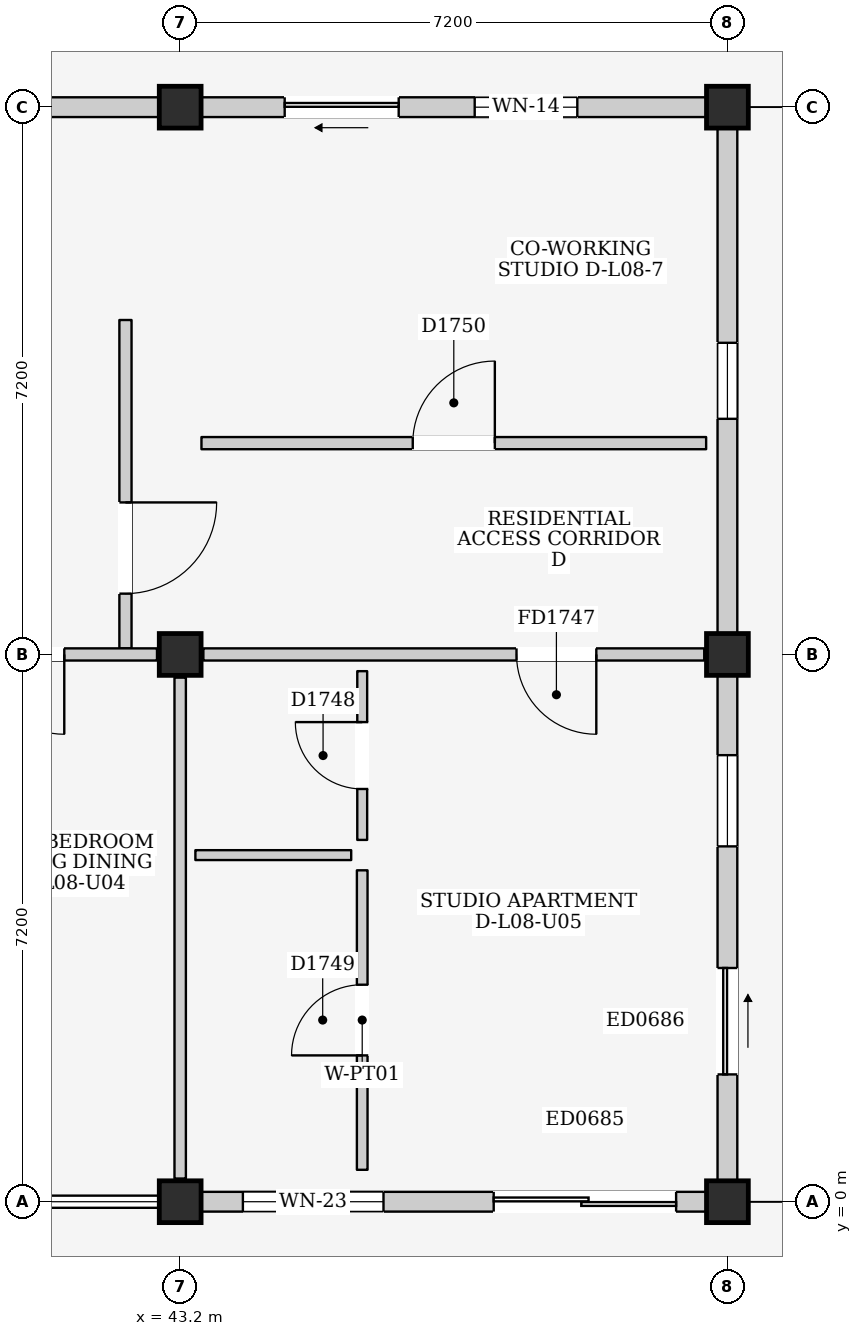
"""IFC4 building model, lengths in metres.
Left out: names, types, materials, properties, quantities, classifications, styles, units other than length and angle.
Written with IfcOpenShell. Run it as: python <this file> out.ifc"""

import sys

from ifc_helpers import new_model, si_unit, direction, frame, frame_2d, origin, origin_2d, place, context, subcontext, project, spatial, rectangle, extrude, element, fill, save


model = new_model("IFC4")
c1 = context("Model", 3, precision=1e-05, world=origin(), true_north=direction((0.0, 1.0)))
c2 = subcontext(c1, "Body", "Model", "MODEL_VIEW")
j1 = project(units=[si_unit("LENGTHUNIT", "METRE"), si_unit("PLANEANGLEUNIT", "RADIAN")], contexts=[c1])
p1 = place(None, origin())
s1 = spatial("IfcSite", under=j1, at=p1, CompositionType="ELEMENT")
p2 = place(p1, origin())
s2 = spatial("IfcBuilding", under=s1, at=p2, CompositionType="ELEMENT")
p3 = place(p2, frame((0.0, 0.0, 28.3)))
s3 = spatial("IfcBuildingStorey", under=s2, at=p3, CompositionType="ELEMENT", Elevation=28.3)
for number, where, z_axis, x_axis in (
    (1, (43.2, 0.0, 0.0), (0.0, 0.0, 1.0), (1.0, 0.0, 0.0)),
    (2, (43.2, 7.2, 0.0), (0.0, 0.0, 1.0), (1.0, 0.0, 0.0)),
    (3, (43.2, 14.4, 0.0), (0.0, 0.0, 1.0), (1.0, 0.0, 0.0)),
    (4, (50.4, 0.0, 0.0), (0.0, 0.0, 1.0), (1.0, 0.0, 0.0)),
    (5, (50.4, 7.2, 0.0), (0.0, 0.0, 1.0), (1.0, 0.0, 0.0)),
    (6, (50.4, 14.4, 0.0), (0.0, 0.0, 1.0), (1.0, 0.0, 0.0)),
):
    element("IfcColumn", number, at=place(p3, frame(where, z_axis=z_axis, x_axis=x_axis)), inside=s3, PredefinedType="COLUMN", context=c2, shape_type="SweptSolid", body=[
        extrude(rectangle(XDim=0.55, YDim=0.55, at=origin_2d()), origin(), (0.0, 0.0, 1.0), 3.2),
    ])
p4 = place(p3, frame((36.275, 14.4, 0.0), z_axis=(0.0, 0.0, 1.0), x_axis=(1.0, 0.0, 0.0)))
e7 = element("IfcWall", 7, at=p4, inside=s3, PredefinedType="ELEMENTEDWALL", context=c2, shape_type="SweptSolid", body=[
    extrude(rectangle(XDim=6.65, YDim=0.26, at=frame_2d((3.325, 0.0))), origin(), (0.0, 0.0, 1.0), 2.345),
])
p5 = place(p4, frame((2.825, 0.0, 1.2)))
e8 = element("IfcOpeningElement", 8, at=p5, cuts=e7, PredefinedType="OPENING", context=c2, shape_type="SweptSolid", body=[
    extrude(rectangle(XDim=1.0, YDim=0.9, at=frame_2d((0.5, 0.45))), frame((0.0, 0.145, 0.0), z_axis=(0.0, -1.0, 0.0), x_axis=(1.0, 0.0, 0.0)), (0.0, 0.0, 1.0), 0.29),
])
p6 = place(p3, frame((43.475, 0.0, 0.0), z_axis=(0.0, 0.0, 1.0), x_axis=(1.0, 0.0, 0.0)))
e9 = element("IfcWall", 9, at=p6, inside=s3, PredefinedType="ELEMENTEDWALL", context=c2, shape_type="SweptSolid", body=[
    extrude(rectangle(XDim=6.65, YDim=0.26, at=frame_2d((3.325, 0.0))), origin(), (0.0, 0.0, 1.0), 2.495),
])
p7 = place(p6, frame((3.85, 0.0, 0.0)))
e10 = element("IfcOpeningElement", 10, at=p7, cuts=e9, PredefinedType="OPENING", context=c2, shape_type="SweptSolid", body=[
    extrude(rectangle(XDim=2.4, YDim=2.12, at=frame_2d((1.2, 1.06))), frame((0.0, 0.145, 0.0), z_axis=(0.0, -1.0, 0.0), x_axis=(1.0, 0.0, 0.0)), (0.0, 0.0, 1.0), 0.29),
])
p8 = place(p6, frame((0.55, 0.0, 0.9)))
e11 = element("IfcOpeningElement", 11, at=p8, cuts=e9, PredefinedType="OPENING", context=c2, shape_type="SweptSolid", body=[
    extrude(rectangle(XDim=1.85, YDim=1.4, at=frame_2d((0.925, 0.7))), frame((0.0, 0.145, 0.0), z_axis=(0.0, -1.0, 0.0), x_axis=(1.0, 0.0, 0.0)), (0.0, 0.0, 1.0), 0.29),
])
p9 = place(p3, frame((50.4, 0.275, 0.0), z_axis=(0.0, 0.0, 1.0), x_axis=(0.0, 1.0, 0.0)))
e12 = element("IfcWall", 12, at=p9, inside=s3, PredefinedType="ELEMENTEDWALL", context=c2, shape_type="SweptSolid", body=[
    extrude(rectangle(XDim=6.65, YDim=0.26, at=frame_2d((3.325, 0.0))), origin(), (0.0, 0.0, 1.0), 2.445),
])
p10 = place(p9, frame((1.4, 0.0, 0.0)))
e13 = element("IfcOpeningElement", 13, at=p10, cuts=e12, PredefinedType="OPENING", context=c2, shape_type="SweptSolid", body=[
    extrude(rectangle(XDim=1.4, YDim=2.1, at=frame_2d((0.7, 1.05))), frame((0.0, 0.145, 0.0), z_axis=(0.0, -1.0, 0.0), x_axis=(1.0, 0.0, 0.0)), (0.0, 0.0, 1.0), 0.29),
])
p11 = place(p9, frame((4.4, 0.0, 0.95)))
e14 = element("IfcOpeningElement", 14, at=p11, cuts=e12, PredefinedType="OPENING", context=c2, shape_type="SweptSolid", body=[
    extrude(rectangle(XDim=1.2, YDim=1.35, at=frame_2d((0.6, 0.675))), frame((0.0, 0.145, 0.0), z_axis=(0.0, -1.0, 0.0), x_axis=(1.0, 0.0, 0.0)), (0.0, 0.0, 1.0), 0.29),
])
p12 = place(p3, frame((43.475, 14.4, 0.0), z_axis=(0.0, 0.0, 1.0), x_axis=(1.0, 0.0, 0.0)))
e15 = element("IfcWall", 15, at=p12, inside=s3, PredefinedType="ELEMENTEDWALL", context=c2, shape_type="SweptSolid", body=[
    extrude(rectangle(XDim=6.65, YDim=0.26, at=frame_2d((3.325, 0.0))), origin(), (0.0, 0.0, 1.0), 2.345),
])
p13 = place(p12, frame((1.1, 0.0, 0.0)))
e16 = element("IfcOpeningElement", 16, at=p13, cuts=e15, PredefinedType="OPENING", context=c2, shape_type="SweptSolid", body=[
    extrude(rectangle(XDim=1.5, YDim=2.12, at=frame_2d((0.75, 1.06))), frame((0.0, 0.145, 0.0), z_axis=(0.0, -1.0, 0.0), x_axis=(1.0, 0.0, 0.0)), (0.0, 0.0, 1.0), 0.29),
])
p14 = place(p12, frame((3.6, 0.0, 0.735)))
e17 = element("IfcOpeningElement", 17, at=p14, cuts=e15, PredefinedType="OPENING", context=c2, shape_type="SweptSolid", body=[
    extrude(rectangle(XDim=1.35, YDim=1.5, at=frame_2d((0.675, 0.75))), frame((0.0, 0.145, 0.0), z_axis=(0.0, -1.0, 0.0), x_axis=(1.0, 0.0, 0.0)), (0.0, 0.0, 1.0), 0.29),
])
p15 = place(p3, frame((50.4, 7.475, 0.0), z_axis=(0.0, 0.0, 1.0), x_axis=(0.0, 1.0, 0.0)))
e18 = element("IfcWall", 18, at=p15, inside=s3, PredefinedType="ELEMENTEDWALL", context=c2, shape_type="SweptSolid", body=[
    extrude(rectangle(XDim=6.65, YDim=0.26, at=frame_2d((3.325, 0.0))), origin(), (0.0, 0.0, 1.0), 2.445),
])
p16 = place(p15, frame((2.825, 0.0, 1.1)))
e19 = element("IfcOpeningElement", 19, at=p16, cuts=e18, PredefinedType="OPENING", context=c2, shape_type="SweptSolid", body=[
    extrude(rectangle(XDim=1.0, YDim=0.9, at=frame_2d((0.5, 0.45))), frame((0.0, 0.145, 0.0), z_axis=(0.0, -1.0, 0.0), x_axis=(1.0, 0.0, 0.0)), (0.0, 0.0, 1.0), 0.29),
])
p17 = place(p3, frame((42.48, 7.28, 0.0), z_axis=(0.0, 0.0, 1.0), x_axis=(0.0, 1.0, 0.0)))
e20 = element("IfcWall", 20, at=p17, inside=s3, PredefinedType="PARTITIONING", context=c2, shape_type="SweptSolid", body=[
    extrude(rectangle(XDim=4.32, YDim=0.16, at=frame_2d((2.16, 0.0))), origin(), (0.0, 0.0, 1.0), 2.95),
])
p18 = place(p17, frame((0.72, 0.0, 0.0)))
e21 = element("IfcOpeningElement", 21, at=p18, cuts=e20, PredefinedType="OPENING", context=c2, shape_type="SweptSolid", body=[
    extrude(rectangle(XDim=1.2, YDim=2.2, at=frame_2d((0.6, 1.1))), frame((0.0, 0.095, 0.0), z_axis=(0.0, -1.0, 0.0), x_axis=(1.0, 0.0, 0.0)), (0.0, 0.0, 1.0), 0.19),
])
p19 = place(p3, frame((36.305, 7.2, 0.0), z_axis=(0.0, 0.0, 1.0), x_axis=(1.0, 0.0, 0.0)))
e22 = element("IfcWall", 22, at=p19, inside=s3, PredefinedType="PARTITIONING", context=c2, shape_type="SweptSolid", body=[
    extrude(rectangle(XDim=6.59, YDim=0.16, at=frame_2d((3.295, 0.0))), origin(), (0.0, 0.0, 1.0), 2.345),
])
p20 = place(p19, frame((4.32, 0.0, 0.0)))
e23 = element("IfcOpeningElement", 23, at=p20, cuts=e22, PredefinedType="OPENING", context=c2, shape_type="SweptSolid", body=[
    extrude(rectangle(XDim=1.05, YDim=2.15, at=frame_2d((0.525, 1.075))), frame((0.0, 0.095, 0.0), z_axis=(0.0, -1.0, 0.0), x_axis=(1.0, 0.0, 0.0)), (0.0, 0.0, 1.0), 0.19),
])
p21 = place(p3, frame((43.2, 0.305, 0.0), z_axis=(0.0, 0.0, 1.0), x_axis=(0.0, 1.0, 0.0)))
e24 = element("IfcWall", 24, at=p21, inside=s3, PredefinedType="PARTITIONING", context=c2, shape_type="SweptSolid", body=[
    extrude(rectangle(XDim=6.59, YDim=0.15, at=frame_2d((3.295, 0.0))), origin(), (0.0, 0.0, 1.0), 2.445),
])
p22 = place(p3, frame((43.505, 7.2, 0.0), z_axis=(0.0, 0.0, 1.0), x_axis=(1.0, 0.0, 0.0)))
e25 = element("IfcWall", 25, at=p22, inside=s3, PredefinedType="PARTITIONING", context=c2, shape_type="SweptSolid", body=[
    extrude(rectangle(XDim=6.59, YDim=0.16, at=frame_2d((3.295, 0.0))), origin(), (0.0, 0.0, 1.0), 2.345),
])
p23 = place(p22, frame((4.12, 0.0, 0.0)))
e26 = element("IfcOpeningElement", 26, at=p23, cuts=e25, PredefinedType="OPENING", context=c2, shape_type="SweptSolid", body=[
    extrude(rectangle(XDim=1.05, YDim=2.15, at=frame_2d((0.525, 1.075))), frame((0.0, 0.095, 0.0), z_axis=(0.0, -1.0, 0.0), x_axis=(1.0, 0.0, 0.0)), (0.0, 0.0, 1.0), 0.19),
])
p24 = place(p3, frame((43.4, 4.56, 0.0), z_axis=(0.0, 0.0, 1.0), x_axis=(1.0, 0.0, 0.0)))
e27 = element("IfcWall", 27, at=p24, inside=s3, PredefinedType="PARTITIONING", context=c2, shape_type="SweptSolid", body=[
    extrude(rectangle(XDim=2.05, YDim=0.13, at=frame_2d((1.025, 0.0))), origin(), (0.0, 0.0, 1.0), 2.95),
])
p25 = place(p3, frame((45.595, 4.76, 0.0), z_axis=(0.0, 0.0, 1.0), x_axis=(0.0, 1.0, 0.0)))
e28 = element("IfcWall", 28, at=p25, inside=s3, PredefinedType="PARTITIONING", context=c2, shape_type="SweptSolid", body=[
    extrude(rectangle(XDim=2.22, YDim=0.13, at=frame_2d((1.11, 0.0))), origin(), (0.0, 0.0, 1.0), 2.95),
])
p26 = place(p25, frame((0.67, 0.0, 0.0)))
e29 = element("IfcOpeningElement", 29, at=p26, cuts=e28, PredefinedType="OPENING", context=c2, shape_type="SweptSolid", body=[
    extrude(rectangle(XDim=0.88, YDim=2.1, at=frame_2d((0.44, 1.05))), frame((0.0, 0.08, 0.0), z_axis=(0.0, -1.0, 0.0), x_axis=(1.0, 0.0, 0.0)), (0.0, 0.0, 1.0), 0.16),
])
p27 = place(p3, frame((45.595, 0.42, 0.0), z_axis=(0.0, 0.0, 1.0), x_axis=(0.0, 1.0, 0.0)))
e30 = element("IfcWall", 30, at=p27, inside=s3, PredefinedType="PARTITIONING", context=c2, shape_type="SweptSolid", body=[
    extrude(rectangle(XDim=3.94, YDim=0.14, at=frame_2d((1.97, 0.0))), origin(), (0.0, 0.0, 1.0), 2.95),
])
p28 = place(p27, frame((1.505, 0.0, 0.0)))
e31 = element("IfcOpeningElement", 31, at=p28, cuts=e30, PredefinedType="OPENING", context=c2, shape_type="SweptSolid", body=[
    extrude(rectangle(XDim=0.93, YDim=2.14, at=frame_2d((0.465, 1.07))), frame((0.0, 0.085, 0.0), z_axis=(0.0, -1.0, 0.0), x_axis=(1.0, 0.0, 0.0)), (0.0, 0.0, 1.0), 0.17),
])
p29 = place(p3, frame((43.48, 9.98, 0.0), z_axis=(0.0, 0.0, 1.0), x_axis=(1.0, 0.0, 0.0)))
e32 = element("IfcWall", 32, at=p29, inside=s3, PredefinedType="PARTITIONING", context=c2, shape_type="SweptSolid", body=[
    extrude(rectangle(XDim=6.64, YDim=0.16, at=frame_2d((3.32, 0.0))), origin(), (0.0, 0.0, 1.0), 2.95),
])
p30 = place(p29, frame((2.78, 0.0, 0.0)))
e33 = element("IfcOpeningElement", 33, at=p30, cuts=e32, PredefinedType="OPENING", context=c2, shape_type="SweptSolid", body=[
    extrude(rectangle(XDim=1.08, YDim=2.22, at=frame_2d((0.54, 1.11))), frame((0.0, 0.095, 0.0), z_axis=(0.0, -1.0, 0.0), x_axis=(1.0, 0.0, 0.0)), (0.0, 0.0, 1.0), 0.19),
])
p31 = place(p7, frame((2.4, 0.0, 0.0), z_axis=(0.0, 0.0, 1.0), x_axis=(-1.0, 0.0, 0.0)))
e34 = element("IfcDoor", 34, at=p31, inside=s3, OperationType="DOUBLE_DOOR_SLIDING", PredefinedType="DOOR", context=c2, shape_type="SweptSolid", body=[
    extrude(rectangle(XDim=2.4, YDim=2.12, at=frame_2d((1.2, 1.06))), frame((0.0, 0.025, 0.0), z_axis=(0.0, -1.0, 0.0), x_axis=(1.0, 0.0, 0.0)), (0.0, 0.0, 1.0), 0.05),
])
fill(e10, e34)
p32 = place(p8, origin())
e35 = element("IfcWindow", 35, at=p32, inside=s3, PartitioningType="DOUBLE_PANEL_VERTICAL", PredefinedType="WINDOW", context=c2, shape_type="SweptSolid", body=[
    extrude(rectangle(XDim=1.85, YDim=1.4, at=frame_2d((0.925, 0.7))), frame((0.0, 0.03, 0.0), z_axis=(0.0, -1.0, 0.0), x_axis=(1.0, 0.0, 0.0)), (0.0, 0.0, 1.0), 0.06),
])
fill(e11, e35)
p33 = place(p10, frame((1.4, 0.0, 0.0), z_axis=(0.0, 0.0, 1.0), x_axis=(-1.0, 0.0, 0.0)))
e36 = element("IfcDoor", 36, at=p33, inside=s3, OperationType="SLIDING_TO_RIGHT", PredefinedType="DOOR", context=c2, shape_type="SweptSolid", body=[
    extrude(rectangle(XDim=1.4, YDim=2.1, at=frame_2d((0.7, 1.05))), frame((0.0, 0.025, 0.0), z_axis=(0.0, -1.0, 0.0), x_axis=(1.0, 0.0, 0.0)), (0.0, 0.0, 1.0), 0.05),
])
fill(e13, e36)
p34 = place(p11, origin())
e37 = element("IfcWindow", 37, at=p34, inside=s3, PartitioningType="SINGLE_PANEL", PredefinedType="WINDOW", context=c2, shape_type="SweptSolid", body=[
    extrude(rectangle(XDim=1.2, YDim=1.35, at=frame_2d((0.6, 0.675))), frame((0.0, 0.03, 0.0), z_axis=(0.0, -1.0, 0.0), x_axis=(1.0, 0.0, 0.0)), (0.0, 0.0, 1.0), 0.06),
])
fill(e14, e37)
p35 = place(p13, frame((1.5, 0.0, 0.0), z_axis=(0.0, 0.0, 1.0), x_axis=(-1.0, 0.0, 0.0)))
e38 = element("IfcDoor", 38, at=p35, inside=s3, OperationType="SLIDING_TO_LEFT", PredefinedType="DOOR", context=c2, shape_type="SweptSolid", body=[
    extrude(rectangle(XDim=1.5, YDim=2.12, at=frame_2d((0.75, 1.06))), frame((0.0, 0.025, 0.0), z_axis=(0.0, -1.0, 0.0), x_axis=(1.0, 0.0, 0.0)), (0.0, 0.0, 1.0), 0.05),
])
fill(e16, e38)
p36 = place(p14, origin())
e39 = element("IfcWindow", 39, at=p36, inside=s3, PartitioningType="SINGLE_PANEL", PredefinedType="WINDOW", context=c2, shape_type="SweptSolid", body=[
    extrude(rectangle(XDim=1.35, YDim=1.5, at=frame_2d((0.675, 0.75))), frame((0.0, 0.03, 0.0), z_axis=(0.0, -1.0, 0.0), x_axis=(1.0, 0.0, 0.0)), (0.0, 0.0, 1.0), 0.06),
])
fill(e17, e39)
p37 = place(p16, origin())
e40 = element("IfcWindow", 40, at=p37, inside=s3, PartitioningType="SINGLE_PANEL", PredefinedType="WINDOW", context=c2, shape_type="SweptSolid", body=[
    extrude(rectangle(XDim=1.0, YDim=0.9, at=frame_2d((0.5, 0.45))), frame((0.0, 0.03, 0.0), z_axis=(0.0, -1.0, 0.0), x_axis=(1.0, 0.0, 0.0)), (0.0, 0.0, 1.0), 0.06),
])
fill(e19, e40)
p38 = place(p18, frame((1.2, 0.0, 0.0), z_axis=(0.0, 0.0, 1.0), x_axis=(-1.0, 0.0, 0.0)))
e41 = element("IfcDoor", 41, at=p38, inside=s3, OperationType="SINGLE_SWING_LEFT", PredefinedType="DOOR", context=c2, shape_type="SweptSolid", body=[
    extrude(rectangle(XDim=1.2, YDim=2.2, at=frame_2d((0.6, 1.1))), frame((0.0, 0.025, 0.0), z_axis=(0.0, -1.0, 0.0), x_axis=(1.0, 0.0, 0.0)), (0.0, 0.0, 1.0), 0.05),
])
fill(e21, e41)
p39 = place(p20, frame((1.05, 0.0, 0.0), z_axis=(0.0, 0.0, 1.0), x_axis=(-1.0, 0.0, 0.0)))
e42 = element("IfcDoor", 42, at=p39, inside=s3, OperationType="SINGLE_SWING_LEFT", PredefinedType="DOOR", context=c2, shape_type="SweptSolid", body=[
    extrude(rectangle(XDim=1.05, YDim=2.15, at=frame_2d((0.525, 1.075))), frame((0.0, 0.025, 0.0), z_axis=(0.0, -1.0, 0.0), x_axis=(1.0, 0.0, 0.0)), (0.0, 0.0, 1.0), 0.05),
])
fill(e23, e42)
p40 = place(p23, frame((1.05, 0.0, 0.0), z_axis=(0.0, 0.0, 1.0), x_axis=(-1.0, 0.0, 0.0)))
e43 = element("IfcDoor", 43, at=p40, inside=s3, OperationType="SINGLE_SWING_LEFT", PredefinedType="DOOR", context=c2, shape_type="SweptSolid", body=[
    extrude(rectangle(XDim=1.05, YDim=2.15, at=frame_2d((0.525, 1.075))), frame((0.0, 0.025, 0.0), z_axis=(0.0, -1.0, 0.0), x_axis=(1.0, 0.0, 0.0)), (0.0, 0.0, 1.0), 0.05),
])
fill(e26, e43)
p41 = place(p26, origin())
e44 = element("IfcDoor", 44, at=p41, inside=s3, OperationType="SINGLE_SWING_RIGHT", PredefinedType="DOOR", context=c2, shape_type="SweptSolid", body=[
    extrude(rectangle(XDim=0.88, YDim=2.1, at=frame_2d((0.44, 1.05))), frame((0.0, 0.025, 0.0), z_axis=(0.0, -1.0, 0.0), x_axis=(1.0, 0.0, 0.0)), (0.0, 0.0, 1.0), 0.05),
])
fill(e29, e44)
p42 = place(p28, origin())
e45 = element("IfcDoor", 45, at=p42, inside=s3, OperationType="SINGLE_SWING_LEFT", PredefinedType="DOOR", context=c2, shape_type="SweptSolid", body=[
    extrude(rectangle(XDim=0.93, YDim=2.14, at=frame_2d((0.465, 1.07))), frame((0.0, 0.025, 0.0), z_axis=(0.0, -1.0, 0.0), x_axis=(1.0, 0.0, 0.0)), (0.0, 0.0, 1.0), 0.05),
])
fill(e31, e45)
p43 = place(p30, origin())
e46 = element("IfcDoor", 46, at=p43, inside=s3, OperationType="SINGLE_SWING_RIGHT", PredefinedType="DOOR", context=c2, shape_type="SweptSolid", body=[
    extrude(rectangle(XDim=1.08, YDim=2.22, at=frame_2d((0.54, 1.11))), frame((0.0, 0.025, 0.0), z_axis=(0.0, -1.0, 0.0), x_axis=(1.0, 0.0, 0.0)), (0.0, 0.0, 1.0), 0.05),
])
fill(e33, e46)
save(model, sys.argv[1])
